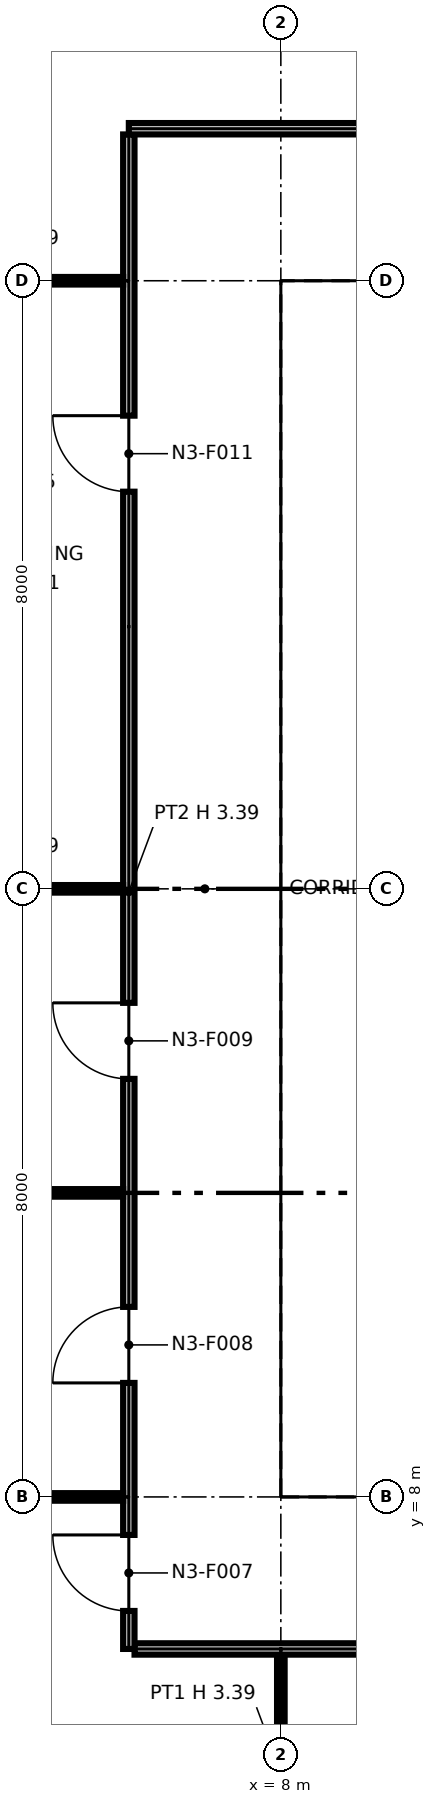
"""IFC4 building model, lengths in metres.
Left out: names, types, materials, properties, quantities, classifications, styles, units other than length and angle.
Written with IfcOpenShell. Run it as: python <this file> out.ifc"""

import sys

from ifc_helpers import new_model, si_unit, direction, frame, frame_2d, origin, origin_2d, place, context, subcontext, project, spatial, polyline, rectangle, i_section, outline, extrude, element, fill, save


model = new_model("IFC4")
c1 = context("Model", 3, precision=1e-05, world=origin(), true_north=direction((0.0, 1.0)))
c2 = subcontext(c1, "Body", "Model", "MODEL_VIEW")
j1 = project(units=[si_unit("LENGTHUNIT", "METRE"), si_unit("PLANEANGLEUNIT", "RADIAN")], contexts=[c1])
p1 = place(None, origin())
s1 = spatial("IfcSite", under=j1, at=p1, CompositionType="ELEMENT")
p2 = place(p1, origin())
s2 = spatial("IfcBuilding", under=s1, at=p2, CompositionType="ELEMENT")
p3 = place(p2, frame((0.0, 0.0, 61.2)))
s3 = spatial("IfcBuildingStorey", under=s2, at=p3, CompositionType="ELEMENT", Elevation=61.2)
for number, where, z_axis, x_axis in (
    (1, (8.0, 8.0, 0.0), (0.0, 0.0, 1.0), (1.0, 0.0, 0.0)),
    (2, (8.0, 16.0, 0.0), (0.0, 0.0, 1.0), (1.0, 0.0, 0.0)),
):
    element("IfcColumn", number, at=place(p3, frame(where, z_axis=z_axis, x_axis=x_axis)), inside=s3, PredefinedType="COLUMN", context=c2, shape_type="SweptSolid", body=[
        extrude(i_section(OverallWidth=0.419, OverallDepth=0.455, WebThickness=0.042, FlangeThickness=0.068, at=origin_2d()), origin(), (0.0, 0.0, 1.0), 4.25),
    ])
p4 = place(p3, frame((8.0, 24.0, 0.0), z_axis=(0.0, 0.0, 1.0), x_axis=(1.0, 0.0, 0.0)))
e3 = element("IfcColumn", 3, at=p4, inside=s3, PredefinedType="COLUMN", context=c2, shape_type="SweptSolid", body=[
    extrude(i_section(OverallWidth=0.424, OverallDepth=0.475, WebThickness=0.048, FlangeThickness=0.077, at=origin_2d()), origin(), (0.0, 0.0, 1.0), 4.25),
])
p5 = place(p3, frame((8.65, 8.75, 0.0), z_axis=(0.0, 0.0, 1.0), x_axis=(1.0, 0.0, 0.0)))
e4 = element("IfcWall", 4, at=p5, inside=s3, PredefinedType="PARTITIONING", context=c2, shape_type="SweptSolid", body=[
    extrude(outline(polyline([(0.0, 0.0), (14.7, 0.0), (14.7, 4.25), (7.469, 4.25), (7.469, 3.632), (7.231, 3.632), (7.23, 4.25), (0.0, 4.25), (0.0, 0.0)])), frame((0.0, 0.1, 0.0), z_axis=(0.0, -1.0, 0.0), x_axis=(1.0, 0.0, 0.0)), (0.0, 0.0, 1.0), 0.2),
])
p6 = place(p5, frame((1.3, 0.0, 0.0)))
e5 = element("IfcOpeningElement", 5, at=p6, cuts=e4, PredefinedType="OPENING", context=c2, shape_type="SweptSolid", body=[
    extrude(rectangle(XDim=1.4, YDim=2.1, at=frame_2d((0.7, 1.05))), frame((0.0, 0.11, 0.0), z_axis=(0.0, -1.0, 0.0), x_axis=(1.0, 0.0, 0.0)), (0.0, 0.0, 1.0), 0.22),
])
p7 = place(p5, frame((4.6, 0.0, 0.0)))
e6 = element("IfcOpeningElement", 6, at=p7, cuts=e4, PredefinedType="OPENING", context=c2, shape_type="SweptSolid", body=[
    extrude(rectangle(XDim=1.4, YDim=2.1, at=frame_2d((0.7, 1.05))), frame((0.0, 0.11, 0.0), z_axis=(0.0, -1.0, 0.0), x_axis=(1.0, 0.0, 0.0)), (0.0, 0.0, 1.0), 0.22),
])
p8 = place(p5, frame((10.4, 0.0, 0.0)))
e7 = element("IfcOpeningElement", 7, at=p8, cuts=e4, PredefinedType="OPENING", context=c2, shape_type="SweptSolid", body=[
    extrude(rectangle(XDim=1.2, YDim=2.1, at=frame_2d((0.6, 1.05))), frame((0.0, 0.11, 0.0), z_axis=(0.0, -1.0, 0.0), x_axis=(1.0, 0.0, 0.0)), (0.0, 0.0, 1.0), 0.22),
])
p9 = place(p3, frame((8.75, 8.85, 0.0), z_axis=(0.0, 0.0, 1.0), x_axis=(0.0, 1.0, 0.0)))
e8 = element("IfcWall", 8, at=p9, inside=s3, PredefinedType="PARTITIONING", context=c2, shape_type="SweptSolid", body=[
    extrude(outline(polyline([(0.0, 0.0), (14.3, 0.0), (14.3, 4.25), (10.231, 4.25), (10.23, 3.789), (10.07, 3.789), (10.069, 4.25), (7.27, 4.25), (7.269, 3.632), (7.031, 3.632), (7.031, 4.25), (0.0, 4.25), (0.0, 0.0)])), frame((0.0, 0.1, 0.0), z_axis=(0.0, -1.0, 0.0), x_axis=(1.0, 0.0, 0.0)), (0.0, 0.0, 1.0), 0.2),
])
p10 = place(p9, frame((8.3, 0.0, 0.0)))
e9 = element("IfcOpeningElement", 9, at=p10, cuts=e8, PredefinedType="OPENING", context=c2, shape_type="SweptSolid", body=[
    extrude(rectangle(XDim=1.8, YDim=2.1, at=frame_2d((0.9, 1.05))), frame((0.0, 0.11, 0.0), z_axis=(0.0, -1.0, 0.0), x_axis=(1.0, 0.0, 0.0)), (0.0, 0.0, 1.0), 0.22),
])
p11 = place(p3, frame((8.65, 23.25, 0.0), z_axis=(0.0, 0.0, 1.0), x_axis=(1.0, 0.0, 0.0)))
e10 = element("IfcWall", 10, at=p11, inside=s3, PredefinedType="PARTITIONING", context=c2, shape_type="SweptSolid", body=[
    extrude(outline(polyline([(0.0, 0.0), (14.7, 0.0), (14.7, 4.25), (7.469, 4.25), (7.469, 3.632), (7.231, 3.632), (7.23, 4.25), (0.0, 4.25), (0.0, 0.0)])), frame((0.0, 0.1, 0.0), z_axis=(0.0, -1.0, 0.0), x_axis=(1.0, 0.0, 0.0)), (0.0, 0.0, 1.0), 0.2),
])
p12 = place(p3, frame((8.85, 16.0, 0.0), z_axis=(0.0, 0.0, 1.0), x_axis=(1.0, 0.0, 0.0)))
e11 = element("IfcWall", 11, at=p12, inside=s3, PredefinedType="PARTITIONING", context=c2, shape_type="SweptSolid", body=[
    extrude(rectangle(XDim=6.912, YDim=0.6, at=frame_2d((3.456, 0.0))), origin(), (0.0, 0.0, 1.0), 3.632),
])
p13 = place(p3, frame((8.85, 19.9, 0.0), z_axis=(0.0, 0.0, 1.0), x_axis=(1.0, 0.0, 0.0)))
e12 = element("IfcWall", 12, at=p13, inside=s3, PredefinedType="PARTITIONING", context=c2, shape_type="SweptSolid", body=[
    extrude(outline(polyline([(0.0, 0.0), (14.3, 0.0), (14.3, 3.789), (7.27, 3.789), (7.269, 3.632), (7.031, 3.632), (7.031, 4.25), (0.0, 4.25), (0.0, 0.0)])), frame((0.0, 0.1, 0.0), z_axis=(0.0, -1.0, 0.0), x_axis=(1.0, 0.0, 0.0)), (0.0, 0.0, 1.0), 0.2),
])
p14 = place(p13, frame((6.35, 0.0, 0.0)))
e13 = element("IfcOpeningElement", 13, at=p14, cuts=e12, PredefinedType="OPENING", context=c2, shape_type="SweptSolid", body=[
    extrude(rectangle(XDim=0.9, YDim=2.1, at=frame_2d((0.45, 1.05))), frame((0.0, 0.11, 0.0), z_axis=(0.0, -1.0, 0.0), x_axis=(1.0, 0.0, 0.0)), (0.0, 0.0, 1.0), 0.22),
])
p15 = place(p13, frame((9.0, 0.0, 0.0)))
e14 = element("IfcOpeningElement", 14, at=p15, cuts=e12, PredefinedType="OPENING", context=c2, shape_type="SweptSolid", body=[
    extrude(rectangle(XDim=0.9, YDim=2.1, at=frame_2d((0.45, 1.05))), frame((0.0, 0.11, 0.0), z_axis=(0.0, -1.0, 0.0), x_axis=(1.0, 0.0, 0.0)), (0.0, 0.0, 1.0), 0.22),
])
p16 = place(p13, frame((11.35, 0.0, 0.0)))
e15 = element("IfcOpeningElement", 15, at=p16, cuts=e12, PredefinedType="OPENING", context=c2, shape_type="SweptSolid", body=[
    extrude(rectangle(XDim=1.0, YDim=2.1, at=frame_2d((0.5, 1.05))), frame((0.0, 0.11, 0.0), z_axis=(0.0, -1.0, 0.0), x_axis=(1.0, 0.0, 0.0)), (0.0, 0.0, 1.0), 0.22),
])
p17 = place(p13, frame((13.125, 0.0, 0.0)))
e16 = element("IfcOpeningElement", 16, at=p17, cuts=e12, PredefinedType="OPENING", context=c2, shape_type="SweptSolid", body=[
    extrude(rectangle(XDim=0.9, YDim=2.1, at=frame_2d((0.45, 1.05))), frame((0.0, 0.11, 0.0), z_axis=(0.0, -1.0, 0.0), x_axis=(1.0, 0.0, 0.0)), (0.0, 0.0, 1.0), 0.22),
])
p18 = place(p3, frame((8.0, 2.83, 0.0), z_axis=(0.0, 0.0, 1.0), x_axis=(0.0, 1.0, 0.0)))
e17 = element("IfcWall", 17, at=p18, inside=s3, PredefinedType="PARTITIONING", context=c2, shape_type="SweptSolid", body=[
    extrude(rectangle(XDim=3.095, YDim=0.1, at=frame_2d((1.547, 0.0))), origin(), (0.0, 0.0, 1.0), 3.391),
])
p19 = place(p3, frame((6.075, 6.0, 0.0), z_axis=(0.0, 0.0, 1.0), x_axis=(1.0, 0.0, 0.0)))
e18 = element("IfcWall", 18, at=p19, inside=s3, PredefinedType="PARTITIONING", context=c2, shape_type="SweptSolid", body=[
    extrude(rectangle(XDim=19.85, YDim=0.15, at=frame_2d((9.925, 0.0))), origin(), (0.0, 0.0, 1.0), 4.25),
])
p20 = place(p19, frame((12.425, 0.0, 0.0), z_axis=(0.0, 0.0, 1.0), x_axis=(-1.0, 0.0, 0.0)))
e19 = element("IfcOpeningElement", 19, at=p20, cuts=e18, PredefinedType="OPENING", context=c2, shape_type="SweptSolid", body=[
    extrude(rectangle(XDim=1.0, YDim=2.1, at=frame_2d((0.5, 1.05))), frame((0.0, 0.085, 0.0), z_axis=(0.0, -1.0, 0.0), x_axis=(1.0, 0.0, 0.0)), (0.0, 0.0, 1.0), 0.17),
])
p21 = place(p19, frame((16.425, 0.0, 0.0), z_axis=(0.0, 0.0, 1.0), x_axis=(-1.0, 0.0, 0.0)))
e20 = element("IfcOpeningElement", 20, at=p21, cuts=e18, PredefinedType="OPENING", context=c2, shape_type="SweptSolid", body=[
    extrude(rectangle(XDim=1.0, YDim=2.1, at=frame_2d((0.5, 1.05))), frame((0.0, 0.085, 0.0), z_axis=(0.0, -1.0, 0.0), x_axis=(1.0, 0.0, 0.0)), (0.0, 0.0, 1.0), 0.17),
])
p22 = place(p19, frame((4.425, 0.0, 0.0), z_axis=(0.0, 0.0, 1.0), x_axis=(-1.0, 0.0, 0.0)))
e21 = element("IfcOpeningElement", 21, at=p22, cuts=e18, PredefinedType="OPENING", context=c2, shape_type="SweptSolid", body=[
    extrude(rectangle(XDim=1.0, YDim=2.1, at=frame_2d((0.5, 1.05))), frame((0.0, 0.085, 0.0), z_axis=(0.0, -1.0, 0.0), x_axis=(1.0, 0.0, 0.0)), (0.0, 0.0, 1.0), 0.17),
])
p23 = place(p19, frame((8.425, 0.0, 0.0), z_axis=(0.0, 0.0, 1.0), x_axis=(-1.0, 0.0, 0.0)))
e22 = element("IfcOpeningElement", 22, at=p23, cuts=e18, PredefinedType="OPENING", context=c2, shape_type="SweptSolid", body=[
    extrude(rectangle(XDim=1.0, YDim=2.1, at=frame_2d((0.5, 1.05))), frame((0.0, 0.085, 0.0), z_axis=(0.0, -1.0, 0.0), x_axis=(1.0, 0.0, 0.0)), (0.0, 0.0, 1.0), 0.17),
])
p24 = place(p19, frame((19.425, 0.0, 0.0), z_axis=(0.0, 0.0, 1.0), x_axis=(-1.0, 0.0, 0.0)))
e23 = element("IfcOpeningElement", 23, at=p24, cuts=e18, PredefinedType="OPENING", context=c2, shape_type="SweptSolid", body=[
    extrude(rectangle(XDim=1.0, YDim=2.1, at=frame_2d((0.5, 1.05))), frame((0.0, 0.085, 0.0), z_axis=(0.0, -1.0, 0.0), x_axis=(1.0, 0.0, 0.0)), (0.0, 0.0, 1.0), 0.17),
])
p25 = place(p3, frame((6.0, 6.0, 0.0), z_axis=(0.0, 0.0, 1.0), x_axis=(0.0, 1.0, 0.0)))
e24 = element("IfcWall", 24, at=p25, inside=s3, PredefinedType="PARTITIONING", context=c2, shape_type="SweptSolid", body=[
    extrude(rectangle(XDim=19.925, YDim=0.15, at=frame_2d((9.962, 0.0))), origin(), (0.0, 0.0, 1.0), 3.391),
])
p26 = place(p25, frame((0.5, 0.0, 0.0)))
e25 = element("IfcOpeningElement", 25, at=p26, cuts=e24, PredefinedType="OPENING", context=c2, shape_type="SweptSolid", body=[
    extrude(rectangle(XDim=1.0, YDim=2.1, at=frame_2d((0.5, 1.05))), frame((0.0, 0.085, 0.0), z_axis=(0.0, -1.0, 0.0), x_axis=(1.0, 0.0, 0.0)), (0.0, 0.0, 1.0), 0.17),
])
p27 = place(p25, frame((3.5, 0.0, 0.0)))
e26 = element("IfcOpeningElement", 26, at=p27, cuts=e24, PredefinedType="OPENING", context=c2, shape_type="SweptSolid", body=[
    extrude(rectangle(XDim=1.0, YDim=2.1, at=frame_2d((0.5, 1.05))), frame((0.0, 0.085, 0.0), z_axis=(0.0, -1.0, 0.0), x_axis=(1.0, 0.0, 0.0)), (0.0, 0.0, 1.0), 0.17),
])
p28 = place(p25, frame((7.5, 0.0, 0.0)))
e27 = element("IfcOpeningElement", 27, at=p28, cuts=e24, PredefinedType="OPENING", context=c2, shape_type="SweptSolid", body=[
    extrude(rectangle(XDim=1.0, YDim=2.1, at=frame_2d((0.5, 1.05))), frame((0.0, 0.085, 0.0), z_axis=(0.0, -1.0, 0.0), x_axis=(1.0, 0.0, 0.0)), (0.0, 0.0, 1.0), 0.17),
])
p29 = place(p25, frame((15.225, 0.0, 0.0)))
e28 = element("IfcOpeningElement", 28, at=p29, cuts=e24, PredefinedType="OPENING", context=c2, shape_type="SweptSolid", body=[
    extrude(rectangle(XDim=1.0, YDim=2.1, at=frame_2d((0.5, 1.05))), frame((0.0, 0.085, 0.0), z_axis=(0.0, -1.0, 0.0), x_axis=(1.0, 0.0, 0.0)), (0.0, 0.0, 1.0), 0.17),
])
for number, where, z_axis, x_axis in (
    (29, (0.13, 8.0, 0.0), (0.0, 0.0, 1.0), (1.0, 0.0, 0.0)),
    (30, (0.13, 12.0, 0.0), (0.0, 0.0, 1.0), (1.0, 0.0, 0.0)),
):
    element("IfcWall", number, at=place(p3, frame(where, z_axis=z_axis, x_axis=x_axis)), inside=s3, PredefinedType="PARTITIONING", context=c2, shape_type="SweptSolid", body=[
        extrude(rectangle(XDim=5.795, YDim=0.1, at=frame_2d((2.897, 0.0))), origin(), (0.0, 0.0, 1.0), 3.391),
    ])
for number, where, z_axis, x_axis in (
    (31, (2.83, 16.0, 0.0), (0.0, 0.0, 1.0), (1.0, 0.0, 0.0)),
    (32, (2.83, 24.0, 0.0), (0.0, 0.0, 1.0), (1.0, 0.0, 0.0)),
):
    element("IfcWall", number, at=place(p3, frame(where, z_axis=z_axis, x_axis=x_axis)), inside=s3, PredefinedType="PARTITIONING", context=c2, shape_type="SweptSolid", body=[
        extrude(rectangle(XDim=3.095, YDim=0.1, at=frame_2d((1.547, 0.0))), origin(), (0.0, 0.0, 1.0), 3.391),
    ])
p30 = place(p3, frame((6.0, 26.0, 0.0), z_axis=(0.0, 0.0, 1.0), x_axis=(1.0, 0.0, 0.0)))
e33 = element("IfcWall", 33, at=p30, inside=s3, PredefinedType="PARTITIONING", context=c2, shape_type="SweptSolid", body=[
    extrude(rectangle(XDim=17.925, YDim=0.15, at=frame_2d((8.962, 0.0))), origin(), (0.0, 0.0, 1.0), 4.25),
])
p31 = place(p30, frame((5.1, 0.0, 0.0)))
e34 = element("IfcOpeningElement", 34, at=p31, cuts=e33, PredefinedType="OPENING", context=c2, shape_type="SweptSolid", body=[
    extrude(rectangle(XDim=1.8, YDim=2.1, at=frame_2d((0.9, 1.05))), frame((0.0, 0.085, 0.0), z_axis=(0.0, -1.0, 0.0), x_axis=(1.0, 0.0, 0.0)), (0.0, 0.0, 1.0), 0.17),
])
p32 = place(p10, origin())
e35 = element("IfcDoor", 35, at=p32, inside=s3, OperationType="DOUBLE_DOOR_SINGLE_SWING", PredefinedType="NOTDEFINED", context=c2, shape_type="SweptSolid", body=[
    extrude(rectangle(XDim=1.8, YDim=2.1, at=frame_2d((0.9, 1.05))), frame((0.0, 0.025, 0.0), z_axis=(0.0, -1.0, 0.0), x_axis=(1.0, 0.0, 0.0)), (0.0, 0.0, 1.0), 0.05),
])
fill(e9, e35)
p33 = place(p26, origin())
e36 = element("IfcDoor", 36, at=p33, inside=s3, OperationType="SINGLE_SWING_RIGHT", PredefinedType="DOOR", context=c2, shape_type="SweptSolid", body=[
    extrude(rectangle(XDim=1.0, YDim=2.1, at=frame_2d((0.5, 1.05))), frame((0.0, 0.025, 0.0), z_axis=(0.0, -1.0, 0.0), x_axis=(1.0, 0.0, 0.0)), (0.0, 0.0, 1.0), 0.05),
])
fill(e25, e36)
p34 = place(p27, origin())
e37 = element("IfcDoor", 37, at=p34, inside=s3, OperationType="SINGLE_SWING_LEFT", PredefinedType="DOOR", context=c2, shape_type="SweptSolid", body=[
    extrude(rectangle(XDim=1.0, YDim=2.1, at=frame_2d((0.5, 1.05))), frame((0.0, 0.025, 0.0), z_axis=(0.0, -1.0, 0.0), x_axis=(1.0, 0.0, 0.0)), (0.0, 0.0, 1.0), 0.05),
])
fill(e26, e37)
p35 = place(p28, origin())
e38 = element("IfcDoor", 38, at=p35, inside=s3, OperationType="SINGLE_SWING_RIGHT", PredefinedType="DOOR", context=c2, shape_type="SweptSolid", body=[
    extrude(rectangle(XDim=1.0, YDim=2.1, at=frame_2d((0.5, 1.05))), frame((0.0, 0.025, 0.0), z_axis=(0.0, -1.0, 0.0), x_axis=(1.0, 0.0, 0.0)), (0.0, 0.0, 1.0), 0.05),
])
fill(e27, e38)
p36 = place(p29, origin())
e39 = element("IfcDoor", 39, at=p36, inside=s3, OperationType="SINGLE_SWING_RIGHT", PredefinedType="DOOR", context=c2, shape_type="SweptSolid", body=[
    extrude(rectangle(XDim=1.0, YDim=2.1, at=frame_2d((0.5, 1.05))), frame((0.0, 0.025, 0.0), z_axis=(0.0, -1.0, 0.0), x_axis=(1.0, 0.0, 0.0)), (0.0, 0.0, 1.0), 0.05),
])
fill(e28, e39)
save(model, sys.argv[1])
